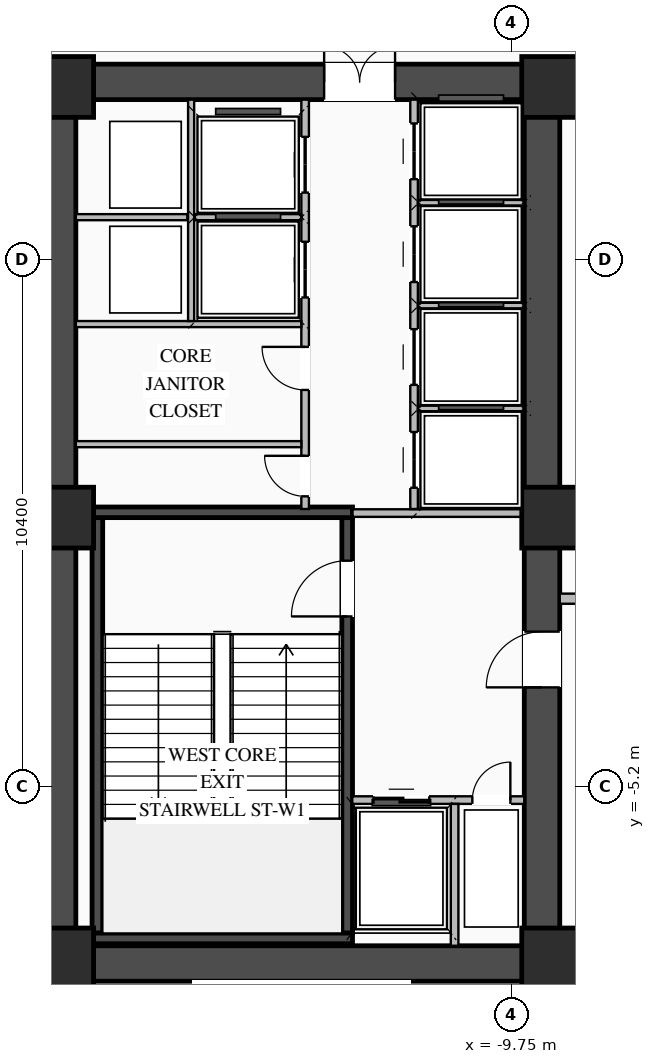
"""IFC4 building model, lengths in metres.
Left out: names, types, materials, properties, quantities, classifications, styles, units other than length and angle.
Written with IfcOpenShell. Run it as: python <this file> out.ifc"""

import sys

from ifc_helpers import new_model, si_unit, direction, frame, frame_2d, origin, origin_2d, place, context, subcontext, project, spatial, rectangle, extrude, element, fill, save


model = new_model("IFC4")
c1 = context("Model", 3, precision=1e-05, world=origin(), true_north=direction((0.0, 1.0)))
c2 = subcontext(c1, "Body", "Model", "MODEL_VIEW")
j1 = project(units=[si_unit("LENGTHUNIT", "METRE"), si_unit("PLANEANGLEUNIT", "RADIAN")], contexts=[c1])
p1 = place(None, origin())
s1 = spatial("IfcSite", under=j1, at=p1, CompositionType="ELEMENT")
p2 = place(p1, origin())
s2 = spatial("IfcBuilding", under=s1, at=p2, CompositionType="ELEMENT")
p3 = place(p2, origin())
s3 = spatial("IfcBuildingStorey", under=s2, at=p3, CompositionType="ELEMENT", Elevation=0.0)
p4 = place(p3, frame((-19.05, -8.7, 0.0), z_axis=(0.0, 0.0, 1.0), x_axis=(1.0, 0.0, 0.0)))
e1 = element("IfcWall", 1, at=p4, inside=s3, PredefinedType="SHEAR", context=c2, shape_type="SweptSolid", body=[
    extrude(rectangle(XDim=10.25, YDim=0.7, at=frame_2d((5.125, 0.0))), origin(), (0.0, 0.0, 1.0), 4.85),
])
p5 = place(p3, frame((-19.05, 8.7, 0.0), z_axis=(0.0, 0.0, 1.0), x_axis=(1.0, 0.0, 0.0)))
e2 = element("IfcWall", 2, at=p5, inside=s3, PredefinedType="SHEAR", context=c2, shape_type="SweptSolid", body=[
    extrude(rectangle(XDim=10.25, YDim=0.7, at=frame_2d((5.125, 0.0))), origin(), (0.0, 0.0, 1.0), 4.85),
])
p6 = place(p5, frame((5.6, 0.0, 0.0)))
e3 = element("IfcOpeningElement", 3, at=p6, cuts=e2, PredefinedType="OPENING", context=c2, shape_type="SweptSolid", body=[
    extrude(rectangle(XDim=1.4, YDim=2.05, at=frame_2d((0.7, 1.025))), frame((0.0, 0.36, 0.0), z_axis=(0.0, -1.0, 0.0), x_axis=(1.0, 0.0, 0.0)), (0.0, 0.0, 1.0), 0.72),
])
p7 = place(p3, frame((-18.7, -8.35, 0.0), z_axis=(0.0, 0.0, 1.0), x_axis=(0.0, 1.0, 0.0)))
e4 = element("IfcWall", 4, at=p7, inside=s3, PredefinedType="SHEAR", context=c2, shape_type="SweptSolid", body=[
    extrude(rectangle(XDim=16.7, YDim=0.7, at=frame_2d((8.35, 0.0))), origin(), (0.0, 0.0, 1.0), 4.85),
])
p8 = place(p3, frame((-9.15, -8.35, 0.0), z_axis=(0.0, 0.0, 1.0), x_axis=(0.0, 1.0, 0.0)))
e5 = element("IfcWall", 5, at=p8, inside=s3, PredefinedType="SHEAR", context=c2, shape_type="SweptSolid", body=[
    extrude(rectangle(XDim=16.7, YDim=0.7, at=frame_2d((8.35, 0.0))), origin(), (0.0, 0.0, 1.0), 4.85),
])
p9 = place(p8, frame((5.1, 0.0, 0.0)))
e6 = element("IfcOpeningElement", 6, at=p9, cuts=e5, PredefinedType="OPENING", context=c2, shape_type="SweptSolid", body=[
    extrude(rectangle(XDim=1.1, YDim=2.08, at=frame_2d((0.55, 1.04))), frame((0.0, 0.36, 0.0), z_axis=(0.0, -1.0, 0.0), x_axis=(1.0, 0.0, 0.0)), (0.0, 0.0, 1.0), 0.72),
])
p10 = place(p3, frame((-12.995, -8.1, 0.0), z_axis=(0.0, 0.0, 1.0), x_axis=(0.0, 1.0, 0.0)))
e7 = element("IfcWall", 7, at=p10, inside=s3, PredefinedType="SHEAR", context=c2, shape_type="SweptSolid", body=[
    extrude(rectangle(XDim=8.2, YDim=0.21, at=frame_2d((4.1, 0.0))), origin(), (0.0, 0.0, 1.0), 4.85),
])
p11 = place(p10, frame((6.25, 0.0, 0.0)))
e8 = element("IfcOpeningElement", 8, at=p11, cuts=e7, PredefinedType="OPENING", context=c2, shape_type="SweptSolid", body=[
    extrude(rectangle(XDim=1.1, YDim=2.15, at=frame_2d((0.55, 1.075))), frame((0.0, 0.115, 0.0), z_axis=(0.0, -1.0, 0.0), x_axis=(1.0, 0.0, 0.0)), (0.0, 0.0, 1.0), 0.23),
])
p12 = place(p3, frame((-17.925, -8.1, 0.0), z_axis=(0.0, 0.0, 1.0), x_axis=(0.0, 1.0, 0.0)))
e9 = element("IfcWall", 9, at=p12, inside=s3, PredefinedType="SHEAR", context=c2, shape_type="SweptSolid", body=[
    extrude(rectangle(XDim=8.2, YDim=0.21, at=frame_2d((4.1, 0.0))), origin(), (0.0, 0.0, 1.0), 4.85),
])
for number, where, z_axis, x_axis in (
    (10, (-18.03, -8.205, 0.0), (0.0, 0.0, 1.0), (1.0, 0.0, 0.0)),
    (11, (-12.89, 0.205, 0.0), (0.0, 0.0, 1.0), (-1.0, 0.0, 0.0)),
):
    element("IfcWall", number, at=place(p3, frame(where, z_axis=z_axis, x_axis=x_axis)), inside=s3, PredefinedType="SHEAR", context=c2, shape_type="SweptSolid", body=[
        extrude(rectangle(XDim=5.14, YDim=0.21, at=frame_2d((2.57, 0.0))), origin(), (0.0, 0.0, 1.0), 4.85),
    ])
for number, where, z_axis, x_axis in (
    (12, (-8.95, -8.6, 0.0), (0.0, 0.0, 1.0), (1.0, 0.0, 0.0)),
    (13, (-8.95, 0.1, 0.0), (0.0, 0.0, 1.0), (1.0, 0.0, 0.0)),
    (14, (-8.95, 8.6, 0.0), (0.0, 0.0, 1.0), (1.0, 0.0, 0.0)),
    (15, (-18.6, -8.6, 0.0), (0.0, 0.0, 1.0), (1.0, 0.0, 0.0)),
    (16, (-18.6, 0.1, 0.0), (0.0, 0.0, 1.0), (1.0, 0.0, 0.0)),
    (17, (-18.6, 8.6, 0.0), (0.0, 0.0, 1.0), (1.0, 0.0, 0.0)),
):
    element("IfcColumn", number, at=place(p3, frame(where, z_axis=z_axis, x_axis=x_axis)), inside=s3, PredefinedType="COLUMN", context=c2, shape_type="SweptSolid", body=[
        extrude(rectangle(XDim=1.2, YDim=1.2, at=origin_2d()), origin(), (0.0, 0.0, 1.0), 5.1),
    ])
p13 = place(p3, frame((-12.895, -5.475, 0.0), z_axis=(0.0, 0.0, 1.0), x_axis=(1.0, 0.0, 0.0)))
e18 = element("IfcWall", 18, at=p13, inside=s3, PredefinedType="STANDARD", context=c2, shape_type="SweptSolid", body=[
    extrude(rectangle(XDim=3.395, YDim=0.15, at=frame_2d((1.698, 0.0))), origin(), (0.0, 0.0, 1.0), 4.83),
])
p14 = place(p13, frame((0.42, 0.0, 0.0)))
e19 = element("IfcOpeningElement", 19, at=p14, cuts=e18, PredefinedType="OPENING", context=c2, shape_type="SweptSolid", body=[
    extrude(rectangle(XDim=1.1, YDim=2.15, at=frame_2d((0.55, 1.075))), frame((0.0, 0.085, 0.0), z_axis=(0.0, -1.0, 0.0), x_axis=(1.0, 0.0, 0.0)), (0.0, 0.0, 1.0), 0.17),
])
p15 = place(p13, frame((2.37, 0.0, 0.0)))
e20 = element("IfcOpeningElement", 20, at=p15, cuts=e18, PredefinedType="OPENING", context=c2, shape_type="SweptSolid", body=[
    extrude(rectangle(XDim=0.75, YDim=2.05, at=frame_2d((0.375, 1.025))), frame((0.0, 0.085, 0.0), z_axis=(0.0, -1.0, 0.0), x_axis=(1.0, 0.0, 0.0)), (0.0, 0.0, 1.0), 0.17),
])
p16 = place(p3, frame((-10.875, -8.35, 0.0), z_axis=(0.0, 0.0, 1.0), x_axis=(0.0, 1.0, 0.0)))
e21 = element("IfcWall", 21, at=p16, inside=s3, PredefinedType="STANDARD", context=c2, shape_type="SweptSolid", body=[
    extrude(rectangle(XDim=2.8, YDim=0.15, at=frame_2d((1.4, 0.0))), origin(), (0.0, 0.0, 1.0), 4.83),
])
p17 = place(p3, frame((-12.89, 0.19, 0.0), z_axis=(0.0, 0.0, 1.0), x_axis=(1.0, 0.0, 0.0)))
e22 = element("IfcWall", 22, at=p17, inside=s3, PredefinedType="STANDARD", context=c2, shape_type="SweptSolid", body=[
    extrude(rectangle(XDim=3.39, YDim=0.15, at=frame_2d((1.695, 0.0))), origin(), (0.0, 0.0, 1.0), 4.025),
])
p18 = place(p3, frame((-11.675, 0.27, 0.0), z_axis=(0.0, 0.0, 1.0), x_axis=(0.0, 1.0, 0.0)))
e23 = element("IfcWall", 23, at=p18, inside=s3, PredefinedType="STANDARD", context=c2, shape_type="SweptSolid", body=[
    extrude(rectangle(XDim=8.08, YDim=0.15, at=frame_2d((4.04, 0.0))), origin(), (0.0, 0.0, 1.0), 4.83),
])
p19 = place(p18, frame((0.42, 0.0, 0.0)))
e24 = element("IfcOpeningElement", 24, at=p19, cuts=e23, PredefinedType="OPENING", context=c2, shape_type="SweptSolid", body=[
    extrude(rectangle(XDim=1.1, YDim=2.1, at=frame_2d((0.55, 1.05))), frame((0.0, 0.085, 0.0), z_axis=(0.0, -1.0, 0.0), x_axis=(1.0, 0.0, 0.0)), (0.0, 0.0, 1.0), 0.17),
])
p20 = place(p18, frame((2.45, 0.0, 0.0)))
e25 = element("IfcOpeningElement", 25, at=p20, cuts=e23, PredefinedType="OPENING", context=c2, shape_type="SweptSolid", body=[
    extrude(rectangle(XDim=1.1, YDim=2.1, at=frame_2d((0.55, 1.05))), frame((0.0, 0.085, 0.0), z_axis=(0.0, -1.0, 0.0), x_axis=(1.0, 0.0, 0.0)), (0.0, 0.0, 1.0), 0.17),
])
p21 = place(p18, frame((4.48, 0.0, 0.0)))
e26 = element("IfcOpeningElement", 26, at=p21, cuts=e23, PredefinedType="OPENING", context=c2, shape_type="SweptSolid", body=[
    extrude(rectangle(XDim=1.1, YDim=2.1, at=frame_2d((0.55, 1.05))), frame((0.0, 0.085, 0.0), z_axis=(0.0, -1.0, 0.0), x_axis=(1.0, 0.0, 0.0)), (0.0, 0.0, 1.0), 0.17),
])
p22 = place(p18, frame((6.51, 0.0, 0.0)))
e27 = element("IfcOpeningElement", 27, at=p22, cuts=e23, PredefinedType="OPENING", context=c2, shape_type="SweptSolid", body=[
    extrude(rectangle(XDim=1.1, YDim=2.1, at=frame_2d((0.55, 1.05))), frame((0.0, 0.085, 0.0), z_axis=(0.0, -1.0, 0.0), x_axis=(1.0, 0.0, 0.0)), (0.0, 0.0, 1.0), 0.17),
])
for number, where, z_axis, x_axis in (
    (28, (-11.6, 2.255, 0.0), (0.0, 0.0, 1.0), (1.0, 0.0, 0.0)),
    (29, (-11.6, 4.285, 0.0), (0.0, 0.0, 1.0), (1.0, 0.0, 0.0)),
    (30, (-11.6, 6.315, 0.0), (0.0, 0.0, 1.0), (1.0, 0.0, 0.0)),
):
    element("IfcWall", number, at=place(p3, frame(where, z_axis=z_axis, x_axis=x_axis)), inside=s3, PredefinedType="STANDARD", context=c2, shape_type="SweptSolid", body=[
        extrude(rectangle(XDim=2.1, YDim=0.11, at=frame_2d((1.05, 0.0))), origin(), (0.0, 0.0, 1.0), 4.83),
    ])
p23 = place(p3, frame((-13.825, 0.27, 0.0), z_axis=(0.0, 0.0, 1.0), x_axis=(0.0, 1.0, 0.0)))
e31 = element("IfcWall", 31, at=p23, inside=s3, PredefinedType="STANDARD", context=c2, shape_type="SweptSolid", body=[
    extrude(rectangle(XDim=8.08, YDim=0.15, at=frame_2d((4.04, 0.0))), origin(), (0.0, 0.0, 1.0), 4.83),
])
p24 = place(p23, frame((4.175, 0.0, 0.0)))
e32 = element("IfcOpeningElement", 32, at=p24, cuts=e31, PredefinedType="OPENING", context=c2, shape_type="SweptSolid", body=[
    extrude(rectangle(XDim=1.1, YDim=2.1, at=frame_2d((0.55, 1.05))), frame((0.0, 0.085, 0.0), z_axis=(0.0, -1.0, 0.0), x_axis=(1.0, 0.0, 0.0)), (0.0, 0.0, 1.0), 0.17),
])
p25 = place(p23, frame((6.245, 0.0, 0.0)))
e33 = element("IfcOpeningElement", 33, at=p25, cuts=e31, PredefinedType="OPENING", context=c2, shape_type="SweptSolid", body=[
    extrude(rectangle(XDim=1.1, YDim=2.1, at=frame_2d((0.55, 1.05))), frame((0.0, 0.085, 0.0), z_axis=(0.0, -1.0, 0.0), x_axis=(1.0, 0.0, 0.0)), (0.0, 0.0, 1.0), 0.17),
])
p26 = place(p23, frame((0.25, 0.0, 0.0)))
e34 = element("IfcOpeningElement", 34, at=p26, cuts=e31, PredefinedType="OPENING", context=c2, shape_type="SweptSolid", body=[
    extrude(rectangle(XDim=0.8, YDim=2.05, at=frame_2d((0.4, 1.025))), frame((0.0, 0.085, 0.0), z_axis=(0.0, -1.0, 0.0), x_axis=(1.0, 0.0, 0.0)), (0.0, 0.0, 1.0), 0.17),
])
p27 = place(p23, frame((2.35, 0.0, 0.0)))
e35 = element("IfcOpeningElement", 35, at=p27, cuts=e31, PredefinedType="OPENING", context=c2, shape_type="SweptSolid", body=[
    extrude(rectangle(XDim=0.85, YDim=2.05, at=frame_2d((0.425, 1.025))), frame((0.0, 0.085, 0.0), z_axis=(0.0, -1.0, 0.0), x_axis=(1.0, 0.0, 0.0)), (0.0, 0.0, 1.0), 0.17),
])
p28 = place(p3, frame((-18.35, 3.92, 0.0), z_axis=(0.0, 0.0, 1.0), x_axis=(1.0, 0.0, 0.0)))
e36 = element("IfcWall", 36, at=p28, inside=s3, PredefinedType="STANDARD", context=c2, shape_type="SweptSolid", body=[
    extrude(rectangle(XDim=4.45, YDim=0.12, at=frame_2d((2.225, 0.0))), origin(), (0.0, 0.0, 1.0), 4.83),
])
p29 = place(p3, frame((-18.35, 6.03, 0.0), z_axis=(0.0, 0.0, 1.0), x_axis=(1.0, 0.0, 0.0)))
e37 = element("IfcWall", 37, at=p29, inside=s3, PredefinedType="STANDARD", context=c2, shape_type="SweptSolid", body=[
    extrude(rectangle(XDim=2.2, YDim=0.12, at=frame_2d((1.1, 0.0))), origin(), (0.0, 0.0, 1.0), 4.83),
])
p30 = place(p3, frame((-16.075, 3.98, 0.0), z_axis=(0.0, 0.0, 1.0), x_axis=(0.0, 1.0, 0.0)))
e38 = element("IfcWall", 38, at=p30, inside=s3, PredefinedType="STANDARD", context=c2, shape_type="SweptSolid", body=[
    extrude(rectangle(XDim=4.37, YDim=0.12, at=frame_2d((2.185, 0.0))), origin(), (0.0, 0.0, 1.0), 4.83),
])
p31 = place(p3, frame((-16.0, 6.03, 0.0), z_axis=(0.0, 0.0, 1.0), x_axis=(1.0, 0.0, 0.0)))
e39 = element("IfcWall", 39, at=p31, inside=s3, PredefinedType="STANDARD", context=c2, shape_type="SweptSolid", body=[
    extrude(rectangle(XDim=2.1, YDim=0.12, at=frame_2d((1.05, 0.0))), origin(), (0.0, 0.0, 1.0), 4.83),
])
p32 = place(p3, frame((-18.35, 1.55, 0.0), z_axis=(0.0, 0.0, 1.0), x_axis=(1.0, 0.0, 0.0)))
e40 = element("IfcWall", 40, at=p32, inside=s3, PredefinedType="STANDARD", context=c2, shape_type="SweptSolid", body=[
    extrude(rectangle(XDim=4.45, YDim=0.12, at=frame_2d((2.225, 0.0))), origin(), (0.0, 0.0, 1.0), 4.83),
])
p33 = place(p3, frame((-8.9, -25.68, 0.0), z_axis=(0.0, 0.0, 1.0), x_axis=(0.0, 1.0, 0.0)))
e41 = element("IfcWall", 41, at=p33, inside=s3, PredefinedType="STANDARD", context=c2, shape_type="SweptSolid", body=[
    extrude(rectangle(XDim=16.63, YDim=0.2, at=frame_2d((8.315, 0.0))), origin(), (0.0, 0.0, 1.0), 4.025),
])
p34 = place(p3, frame((-8.8, -1.5, 0.0), z_axis=(0.0, 0.0, 1.0), x_axis=(1.0, 0.0, 0.0)))
e42 = element("IfcWall", 42, at=p34, inside=s3, PredefinedType="STANDARD", context=c2, shape_type="SweptSolid", body=[
    extrude(rectangle(XDim=3.0, YDim=0.2, at=frame_2d((1.5, 0.0))), origin(), (0.0, 0.0, 1.0), 4.83),
])
p35 = place(p11, origin())
e43 = element("IfcDoor", 43, at=p35, inside=s3, OperationType="SINGLE_SWING_LEFT", PredefinedType="DOOR", context=c2, shape_type="SweptSolid", body=[
    extrude(rectangle(XDim=1.1, YDim=2.15, at=frame_2d((0.55, 1.075))), frame((0.0, 0.025, 0.0), z_axis=(0.0, -1.0, 0.0), x_axis=(1.0, 0.0, 0.0)), (0.0, 0.0, 1.0), 0.05),
])
fill(e8, e43)
p36 = place(p14, origin())
e44 = element("IfcDoor", 44, at=p36, inside=s3, OperationType="DOUBLE_DOOR_SLIDING", PredefinedType="DOOR", context=c2, shape_type="SweptSolid", body=[
    extrude(rectangle(XDim=1.1, YDim=2.15, at=frame_2d((0.55, 1.075))), frame((0.0, 0.025, 0.0), z_axis=(0.0, -1.0, 0.0), x_axis=(1.0, 0.0, 0.0)), (0.0, 0.0, 1.0), 0.05),
])
fill(e19, e44)
p37 = place(p15, origin())
e45 = element("IfcDoor", 45, at=p37, inside=s3, OperationType="SINGLE_SWING_RIGHT", PredefinedType="DOOR", context=c2, shape_type="SweptSolid", body=[
    extrude(rectangle(XDim=0.75, YDim=2.05, at=frame_2d((0.375, 1.025))), frame((0.0, 0.025, 0.0), z_axis=(0.0, -1.0, 0.0), x_axis=(1.0, 0.0, 0.0)), (0.0, 0.0, 1.0), 0.05),
])
fill(e20, e45)
p38 = place(p9, origin())
e46 = element("IfcDoor", 46, at=p38, inside=s3, OperationType="SINGLE_SWING_LEFT", PredefinedType="DOOR", context=c2, shape_type="SweptSolid", body=[
    extrude(rectangle(XDim=1.1, YDim=2.08, at=frame_2d((0.55, 1.04))), frame((0.0, 0.305, 0.0), z_axis=(0.0, -1.0, 0.0), x_axis=(1.0, 0.0, 0.0)), (0.0, 0.0, 1.0), 0.05),
])
fill(e6, e46)
p39 = place(p6, origin())
e47 = element("IfcDoor", 47, at=p39, inside=s3, OperationType="DOUBLE_DOOR_SINGLE_SWING", PredefinedType="DOOR", context=c2, shape_type="SweptSolid", body=[
    extrude(rectangle(XDim=1.4, YDim=2.05, at=frame_2d((0.7, 1.025))), frame((0.0, 0.295, 0.0), z_axis=(0.0, -1.0, 0.0), x_axis=(1.0, 0.0, 0.0)), (0.0, 0.0, 1.0), 0.05),
])
fill(e3, e47)
p40 = place(p19, origin())
e48 = element("IfcDoor", 48, at=p40, inside=s3, OperationType="DOUBLE_DOOR_SLIDING", PredefinedType="DOOR", context=c2, shape_type="SweptSolid", body=[
    extrude(rectangle(XDim=1.1, YDim=2.1, at=frame_2d((0.55, 1.05))), frame((0.0, 0.025, 0.0), z_axis=(0.0, -1.0, 0.0), x_axis=(1.0, 0.0, 0.0)), (0.0, 0.0, 1.0), 0.05),
])
fill(e24, e48)
p41 = place(p20, origin())
e49 = element("IfcDoor", 49, at=p41, inside=s3, OperationType="DOUBLE_DOOR_SLIDING", PredefinedType="DOOR", context=c2, shape_type="SweptSolid", body=[
    extrude(rectangle(XDim=1.1, YDim=2.1, at=frame_2d((0.55, 1.05))), frame((0.0, 0.025, 0.0), z_axis=(0.0, -1.0, 0.0), x_axis=(1.0, 0.0, 0.0)), (0.0, 0.0, 1.0), 0.05),
])
fill(e25, e49)
p42 = place(p21, origin())
e50 = element("IfcDoor", 50, at=p42, inside=s3, OperationType="DOUBLE_DOOR_SLIDING", PredefinedType="DOOR", context=c2, shape_type="SweptSolid", body=[
    extrude(rectangle(XDim=1.1, YDim=2.1, at=frame_2d((0.55, 1.05))), frame((0.0, 0.025, 0.0), z_axis=(0.0, -1.0, 0.0), x_axis=(1.0, 0.0, 0.0)), (0.0, 0.0, 1.0), 0.05),
])
fill(e26, e50)
p43 = place(p22, origin())
e51 = element("IfcDoor", 51, at=p43, inside=s3, OperationType="DOUBLE_DOOR_SLIDING", PredefinedType="DOOR", context=c2, shape_type="SweptSolid", body=[
    extrude(rectangle(XDim=1.1, YDim=2.1, at=frame_2d((0.55, 1.05))), frame((0.0, 0.025, 0.0), z_axis=(0.0, -1.0, 0.0), x_axis=(1.0, 0.0, 0.0)), (0.0, 0.0, 1.0), 0.05),
])
fill(e27, e51)
p44 = place(p24, origin())
e52 = element("IfcDoor", 52, at=p44, inside=s3, OperationType="DOUBLE_DOOR_SLIDING", PredefinedType="DOOR", context=c2, shape_type="SweptSolid", body=[
    extrude(rectangle(XDim=1.1, YDim=2.1, at=frame_2d((0.55, 1.05))), frame((0.0, 0.025, 0.0), z_axis=(0.0, -1.0, 0.0), x_axis=(1.0, 0.0, 0.0)), (0.0, 0.0, 1.0), 0.05),
])
fill(e32, e52)
p45 = place(p25, origin())
e53 = element("IfcDoor", 53, at=p45, inside=s3, OperationType="DOUBLE_DOOR_SLIDING", PredefinedType="DOOR", context=c2, shape_type="SweptSolid", body=[
    extrude(rectangle(XDim=1.1, YDim=2.1, at=frame_2d((0.55, 1.05))), frame((0.0, 0.025, 0.0), z_axis=(0.0, -1.0, 0.0), x_axis=(1.0, 0.0, 0.0)), (0.0, 0.0, 1.0), 0.05),
])
fill(e33, e53)
p46 = place(p26, origin())
e54 = element("IfcDoor", 54, at=p46, inside=s3, OperationType="SINGLE_SWING_RIGHT", PredefinedType="DOOR", context=c2, shape_type="SweptSolid", body=[
    extrude(rectangle(XDim=0.8, YDim=2.05, at=frame_2d((0.4, 1.025))), frame((0.0, 0.025, 0.0), z_axis=(0.0, -1.0, 0.0), x_axis=(1.0, 0.0, 0.0)), (0.0, 0.0, 1.0), 0.05),
])
fill(e34, e54)
p47 = place(p27, origin())
e55 = element("IfcDoor", 55, at=p47, inside=s3, OperationType="SINGLE_SWING_RIGHT", PredefinedType="DOOR", context=c2, shape_type="SweptSolid", body=[
    extrude(rectangle(XDim=0.85, YDim=2.05, at=frame_2d((0.425, 1.025))), frame((0.0, 0.025, 0.0), z_axis=(0.0, -1.0, 0.0), x_axis=(1.0, 0.0, 0.0)), (0.0, 0.0, 1.0), 0.05),
])
fill(e35, e55)
save(model, sys.argv[1])
